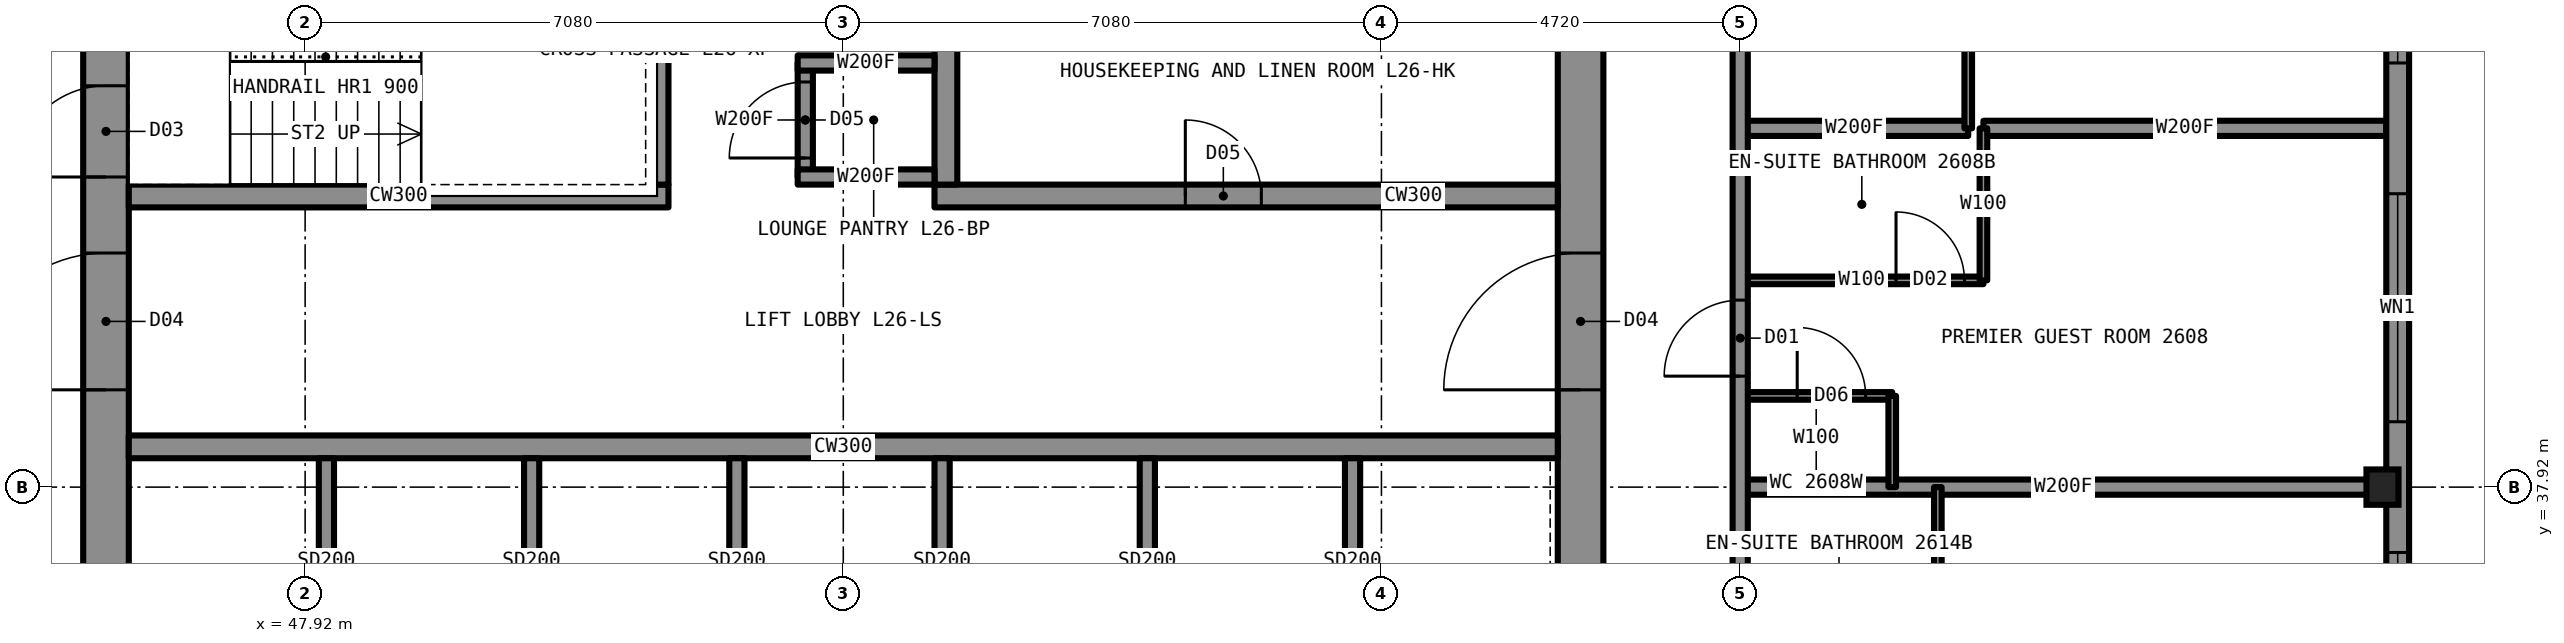
"""IFC4 building model, lengths in metres.
Left out: names, types, materials, properties, quantities, classifications, styles, units other than length and angle.
Written with IfcOpenShell. Run it as: python <this file> out.ifc"""

import sys

from ifc_helpers import new_model, si_unit, direction, frame, frame_2d, origin, origin_2d, place, context, subcontext, project, spatial, rectangle, i_section, extrude, element, fill, save


model = new_model("IFC4")
c1 = context("Model", 3, precision=1e-05, world=origin(), true_north=direction((0.0, 1.0)))
c2 = subcontext(c1, "Body", "Model", "MODEL_VIEW")
j1 = project(units=[si_unit("LENGTHUNIT", "METRE"), si_unit("PLANEANGLEUNIT", "RADIAN")], contexts=[c1])
p1 = place(None, origin())
s1 = spatial("IfcSite", under=j1, at=p1, CompositionType="ELEMENT")
p2 = place(p1, origin())
s2 = spatial("IfcBuilding", under=s1, at=p2, CompositionType="ELEMENT")
p3 = place(p2, frame((0.0, 0.0, 93.4)))
s3 = spatial("IfcBuildingStorey", under=s2, at=p3, CompositionType="ELEMENT", Elevation=93.4)
p4 = place(p3, frame((75.25, 37.92, 0.0), z_axis=(0.0, 0.0, 1.0), x_axis=(1.0, 0.0, 0.0)))
e1 = element("IfcColumn", 1, at=p4, inside=s3, PredefinedType="COLUMN", context=c2, shape_type="SweptSolid", body=[
    extrude(i_section(OverallWidth=0.442, OverallDepth=0.531, WebThickness=0.066, FlangeThickness=0.106, at=origin_2d()), origin(), (0.0, 0.0, 1.0), 3.5),
])
p5 = place(p3, frame((64.7, 35.6, 0.0), z_axis=(0.0, 0.0, 1.0), x_axis=(0.0, 1.0, 0.0)))
e2 = element("IfcWall", 2, at=p5, inside=s3, PredefinedType="SHEAR", context=c2, shape_type="SweptSolid", body=[
    extrude(rectangle(XDim=18.8, YDim=0.6, at=frame_2d((9.4, 0.0))), origin(), (0.0, 0.0, 1.0), 3.5),
])
p6 = place(p5, frame((13.4, 0.0, 0.0)))
e3 = element("IfcOpeningElement", 3, at=p6, cuts=e2, PredefinedType="OPENING", context=c2, shape_type="SweptSolid", body=[
    extrude(rectangle(XDim=1.8, YDim=2.2, at=frame_2d((0.9, 1.1))), frame((0.0, 0.31, 0.0), z_axis=(0.0, -1.0, 0.0), x_axis=(1.0, 0.0, 0.0)), (0.0, 0.0, 1.0), 0.62),
])
p7 = place(p5, frame((3.6, 0.0, 0.0)))
e4 = element("IfcOpeningElement", 4, at=p7, cuts=e2, PredefinedType="OPENING", context=c2, shape_type="SweptSolid", body=[
    extrude(rectangle(XDim=1.8, YDim=2.2, at=frame_2d((0.9, 1.1))), frame((0.0, 0.31, 0.0), z_axis=(0.0, -1.0, 0.0), x_axis=(1.0, 0.0, 0.0)), (0.0, 0.0, 1.0), 0.62),
])
p8 = place(p3, frame((45.3, 35.6, 0.0), z_axis=(0.0, 0.0, 1.0), x_axis=(0.0, 1.0, 0.0)))
e5 = element("IfcWall", 5, at=p8, inside=s3, PredefinedType="SHEAR", context=c2, shape_type="SweptSolid", body=[
    extrude(rectangle(XDim=18.8, YDim=0.6, at=frame_2d((9.4, 0.0))), origin(), (0.0, 0.0, 1.0), 3.5),
])
p9 = place(p8, frame((13.4, 0.0, 0.0)))
e6 = element("IfcOpeningElement", 6, at=p9, cuts=e5, PredefinedType="OPENING", context=c2, shape_type="SweptSolid", body=[
    extrude(rectangle(XDim=1.8, YDim=2.2, at=frame_2d((0.9, 1.1))), frame((0.0, 0.31, 0.0), z_axis=(0.0, -1.0, 0.0), x_axis=(1.0, 0.0, 0.0)), (0.0, 0.0, 1.0), 0.62),
])
p10 = place(p8, frame((3.6, 0.0, 0.0)))
e7 = element("IfcOpeningElement", 7, at=p10, cuts=e5, PredefinedType="OPENING", context=c2, shape_type="SweptSolid", body=[
    extrude(rectangle(XDim=1.8, YDim=2.2, at=frame_2d((0.9, 1.1))), frame((0.0, 0.31, 0.0), z_axis=(0.0, -1.0, 0.0), x_axis=(1.0, 0.0, 0.0)), (0.0, 0.0, 1.0), 0.62),
])
p11 = place(p8, frame((6.4, 0.0, 0.0)))
e8 = element("IfcOpeningElement", 8, at=p11, cuts=e5, PredefinedType="OPENING", context=c2, shape_type="SweptSolid", body=[
    extrude(rectangle(XDim=1.2, YDim=2.2, at=frame_2d((0.6, 1.1))), frame((0.0, 0.31, 0.0), z_axis=(0.0, -1.0, 0.0), x_axis=(1.0, 0.0, 0.0)), (0.0, 0.0, 1.0), 0.62),
])
p12 = place(p3, frame((45.6, 38.45, 0.0), z_axis=(0.0, 0.0, 1.0), x_axis=(1.0, 0.0, 0.0)))
e9 = element("IfcWall", 9, at=p12, inside=s3, PredefinedType="SHEAR", context=c2, shape_type="SweptSolid", body=[
    extrude(rectangle(XDim=18.8, YDim=0.3, at=frame_2d((9.4, 0.0))), origin(), (0.0, 0.0, 1.0), 3.5),
])
p13 = place(p3, frame((45.6, 41.75, 0.0), z_axis=(0.0, 0.0, 1.0), x_axis=(1.0, 0.0, 0.0)))
e10 = element("IfcWall", 10, at=p13, inside=s3, PredefinedType="SHEAR", context=c2, shape_type="SweptSolid", body=[
    extrude(rectangle(XDim=7.1, YDim=0.3, at=frame_2d((3.55, 0.0))), origin(), (0.0, 0.0, 1.0), 3.5),
])
p14 = place(p3, frame((56.2, 41.75, 0.0), z_axis=(0.0, 0.0, 1.0), x_axis=(1.0, 0.0, 0.0)))
e11 = element("IfcWall", 11, at=p14, inside=s3, PredefinedType="SHEAR", context=c2, shape_type="SweptSolid", body=[
    extrude(rectangle(XDim=8.2, YDim=0.3, at=frame_2d((4.1, 0.0))), origin(), (0.0, 0.0, 1.0), 3.5),
])
p15 = place(p14, frame((3.3, 0.0, 0.0)))
e12 = element("IfcOpeningElement", 12, at=p15, cuts=e11, PredefinedType="OPENING", context=c2, shape_type="SweptSolid", body=[
    extrude(rectangle(XDim=1.0, YDim=2.1, at=frame_2d((0.5, 1.05))), frame((0.0, 0.16, 0.0), z_axis=(0.0, -1.0, 0.0), x_axis=(1.0, 0.0, 0.0)), (0.0, 0.0, 1.0), 0.32),
])
p16 = place(p3, frame((52.55, 41.9, 0.0), z_axis=(0.0, 0.0, 1.0), x_axis=(0.0, 1.0, 0.0)))
e13 = element("IfcWall", 13, at=p16, inside=s3, PredefinedType="SHEAR", context=c2, shape_type="SweptSolid", body=[
    extrude(rectangle(XDim=6.2, YDim=0.3, at=frame_2d((3.1, 0.0))), origin(), (0.0, 0.0, 1.0), 3.5),
])
p17 = place(p16, frame((4.125, 0.0, 0.0)))
e14 = element("IfcOpeningElement", 14, at=p17, cuts=e13, PredefinedType="OPENING", context=c2, shape_type="SweptSolid", body=[
    extrude(rectangle(XDim=1.2, YDim=2.2, at=frame_2d((0.6, 1.1))), frame((0.0, 0.16, 0.0), z_axis=(0.0, -1.0, 0.0), x_axis=(1.0, 0.0, 0.0)), (0.0, 0.0, 1.0), 0.32),
])
p18 = place(p3, frame((56.35, 41.9, 0.0), z_axis=(0.0, 0.0, 1.0), x_axis=(0.0, 1.0, 0.0)))
e15 = element("IfcWall", 15, at=p18, inside=s3, PredefinedType="SHEAR", context=c2, shape_type="SweptSolid", body=[
    extrude(rectangle(XDim=9.5, YDim=0.3, at=frame_2d((4.75, 0.0))), origin(), (0.0, 0.0, 1.0), 3.5),
])
p19 = place(p18, frame((7.1, 0.0, 0.0)))
e16 = element("IfcOpeningElement", 16, at=p19, cuts=e15, PredefinedType="OPENING", context=c2, shape_type="SweptSolid", body=[
    extrude(rectangle(XDim=1.8, YDim=2.2, at=frame_2d((0.9, 1.1))), frame((0.0, 0.16, 0.0), z_axis=(0.0, -1.0, 0.0), x_axis=(1.0, 0.0, 0.0)), (0.0, 0.0, 1.0), 0.32),
])
p20 = place(p3, frame((66.8, 42.64, 0.0), z_axis=(0.0, 0.0, 1.0), x_axis=(1.0, 0.0, 0.0)))
e17 = element("IfcWall", 17, at=p20, inside=s3, PredefinedType="PARTITIONING", context=c2, shape_type="SweptSolid", body=[
    extrude(rectangle(XDim=3.0, YDim=0.2, at=frame_2d((1.5, 0.0))), origin(), (0.0, 0.0, 1.0), 2.731),
])
p21 = place(p3, frame((70.0, 42.64, 0.0), z_axis=(0.0, 0.0, 1.0), x_axis=(1.0, 0.0, 0.0)))
e18 = element("IfcWall", 18, at=p21, inside=s3, PredefinedType="PARTITIONING", context=c2, shape_type="SweptSolid", body=[
    extrude(rectangle(XDim=5.3, YDim=0.2, at=frame_2d((2.65, 0.0))), origin(), (0.0, 0.0, 1.0), 2.731),
])
p22 = place(p3, frame((66.8, 40.64, 0.0), z_axis=(0.0, 0.0, 1.0), x_axis=(1.0, 0.0, 0.0)))
e19 = element("IfcWall", 19, at=p22, inside=s3, PredefinedType="PARTITIONING", context=c2, shape_type="SweptSolid", body=[
    extrude(rectangle(XDim=3.2, YDim=0.1, at=frame_2d((1.6, 0.0))), origin(), (0.0, 0.0, 1.0), 3.33),
])
p23 = place(p22, frame((2.05, 0.0, 0.0)))
e20 = element("IfcOpeningElement", 20, at=p23, cuts=e19, PredefinedType="OPENING", context=c2, shape_type="SweptSolid", body=[
    extrude(rectangle(XDim=0.9, YDim=2.1, at=frame_2d((0.45, 1.05))), frame((0.0, 0.06, 0.0), z_axis=(0.0, -1.0, 0.0), x_axis=(1.0, 0.0, 0.0)), (0.0, 0.0, 1.0), 0.12),
])
p24 = place(p3, frame((66.8, 39.12, 0.0), z_axis=(0.0, 0.0, 1.0), x_axis=(1.0, 0.0, 0.0)))
e21 = element("IfcWall", 21, at=p24, inside=s3, PredefinedType="PARTITIONING", context=c2, shape_type="SweptSolid", body=[
    extrude(rectangle(XDim=2.0, YDim=0.1, at=frame_2d((1.0, 0.0))), origin(), (0.0, 0.0, 1.0), 3.33),
])
p25 = place(p24, frame((0.75, 0.0, 0.0)))
e22 = element("IfcOpeningElement", 22, at=p25, cuts=e21, PredefinedType="OPENING", context=c2, shape_type="SweptSolid", body=[
    extrude(rectangle(XDim=0.9, YDim=2.1, at=frame_2d((0.45, 1.05))), frame((0.0, 0.06, 0.0), z_axis=(0.0, -1.0, 0.0), x_axis=(1.0, 0.0, 0.0)), (0.0, 0.0, 1.0), 0.12),
])
p26 = place(p3, frame((66.8, 37.92, 0.0), z_axis=(0.0, 0.0, 1.0), x_axis=(1.0, 0.0, 0.0)))
e23 = element("IfcWall", 23, at=p26, inside=s3, PredefinedType="PARTITIONING", context=c2, shape_type="SweptSolid", body=[
    extrude(rectangle(XDim=8.5, YDim=0.2, at=frame_2d((4.25, 0.0))), origin(), (0.0, 0.0, 1.0), 2.573),
])
p27 = place(p3, frame((66.8, 33.22, 0.0), z_axis=(0.0, 0.0, 1.0), x_axis=(0.0, 1.0, 0.0)))
e24 = element("IfcWall", 24, at=p27, inside=s3, PredefinedType="PARTITIONING", context=c2, shape_type="SweptSolid", body=[
    extrude(rectangle(XDim=23.56, YDim=0.2, at=frame_2d((11.78, 0.0))), origin(), (0.0, 0.0, 1.0), 3.33),
])
p28 = place(p27, frame((6.16, 0.0, 0.0)))
e25 = element("IfcOpeningElement", 25, at=p28, cuts=e24, PredefinedType="OPENING", context=c2, shape_type="SweptSolid", body=[
    extrude(rectangle(XDim=1.0, YDim=2.2, at=frame_2d((0.5, 1.1))), frame((0.0, 0.11, 0.0), z_axis=(0.0, -1.0, 0.0), x_axis=(1.0, 0.0, 0.0)), (0.0, 0.0, 1.0), 0.22),
])
p29 = place(p27, frame((12.42, 0.0, 0.0)))
e26 = element("IfcOpeningElement", 26, at=p29, cuts=e24, PredefinedType="OPENING", context=c2, shape_type="SweptSolid", body=[
    extrude(rectangle(XDim=1.0, YDim=2.2, at=frame_2d((0.5, 1.1))), frame((0.0, 0.11, 0.0), z_axis=(0.0, -1.0, 0.0), x_axis=(1.0, 0.0, 0.0)), (0.0, 0.0, 1.0), 0.22),
])
p30 = place(p27, frame((21.82, 0.0, 0.0)))
e27 = element("IfcOpeningElement", 27, at=p30, cuts=e24, PredefinedType="OPENING", context=c2, shape_type="SweptSolid", body=[
    extrude(rectangle(XDim=1.1, YDim=2.2, at=frame_2d((0.55, 1.1))), frame((0.0, 0.11, 0.0), z_axis=(0.0, -1.0, 0.0), x_axis=(1.0, 0.0, 0.0)), (0.0, 0.0, 1.0), 0.22),
])
p31 = place(p27, frame((0.64, 0.0, 0.0)))
e28 = element("IfcOpeningElement", 28, at=p31, cuts=e24, PredefinedType="OPENING", context=c2, shape_type="SweptSolid", body=[
    extrude(rectangle(XDim=1.1, YDim=2.2, at=frame_2d((0.55, 1.1))), frame((0.0, 0.11, 0.0), z_axis=(0.0, -1.0, 0.0), x_axis=(1.0, 0.0, 0.0)), (0.0, 0.0, 1.0), 0.22),
])
p32 = place(p3, frame((68.8, 37.92, 0.0), z_axis=(0.0, 0.0, 1.0), x_axis=(0.0, 1.0, 0.0)))
e29 = element("IfcWall", 29, at=p32, inside=s3, PredefinedType="PARTITIONING", context=c2, shape_type="SweptSolid", body=[
    extrude(rectangle(XDim=1.2, YDim=0.1, at=frame_2d((0.6, 0.0))), origin(), (0.0, 0.0, 1.0), 3.33),
])
p33 = place(p3, frame((69.4, 35.32, 0.0), z_axis=(0.0, 0.0, 1.0), x_axis=(0.0, 1.0, 0.0)))
e30 = element("IfcWall", 30, at=p33, inside=s3, PredefinedType="PARTITIONING", context=c2, shape_type="SweptSolid", body=[
    extrude(rectangle(XDim=2.6, YDim=0.1, at=frame_2d((1.3, 0.0))), origin(), (0.0, 0.0, 1.0), 3.33),
])
p34 = place(p3, frame((69.8, 42.64, 0.0), z_axis=(0.0, 0.0, 1.0), x_axis=(0.0, 1.0, 0.0)))
e31 = element("IfcWall", 31, at=p34, inside=s3, PredefinedType="PARTITIONING", context=c2, shape_type="SweptSolid", body=[
    extrude(rectangle(XDim=2.6, YDim=0.1, at=frame_2d((1.3, 0.0))), origin(), (0.0, 0.0, 1.0), 3.33),
])
p35 = place(p3, frame((70.0, 40.64, 0.0), z_axis=(0.0, 0.0, 1.0), x_axis=(0.0, 1.0, 0.0)))
e32 = element("IfcWall", 32, at=p35, inside=s3, PredefinedType="PARTITIONING", context=c2, shape_type="SweptSolid", body=[
    extrude(rectangle(XDim=2.0, YDim=0.1, at=frame_2d((1.0, 0.0))), origin(), (0.0, 0.0, 1.0), 3.33),
])
p36 = place(p3, frame((54.5, 42.0, 0.0), z_axis=(0.0, 0.0, 1.0), x_axis=(0.0, 1.0, 0.0)))
e33 = element("IfcWall", 33, at=p36, inside=s3, PredefinedType="PARTITIONING", context=c2, shape_type="SweptSolid", body=[
    extrude(rectangle(XDim=3.1, YDim=0.2, at=frame_2d((1.55, 0.0))), origin(), (0.0, 0.0, 1.0), 3.33),
])
p37 = place(p36, frame((1.05, 0.0, 0.0)))
e34 = element("IfcOpeningElement", 34, at=p37, cuts=e33, PredefinedType="OPENING", context=c2, shape_type="SweptSolid", body=[
    extrude(rectangle(XDim=1.0, YDim=2.1, at=frame_2d((0.5, 1.05))), frame((0.0, 0.11, 0.0), z_axis=(0.0, -1.0, 0.0), x_axis=(1.0, 0.0, 0.0)), (0.0, 0.0, 1.0), 0.22),
])
p38 = place(p3, frame((54.4, 42.0, 0.0), z_axis=(0.0, 0.0, 1.0), x_axis=(1.0, 0.0, 0.0)))
e35 = element("IfcWall", 35, at=p38, inside=s3, PredefinedType="PARTITIONING", context=c2, shape_type="SweptSolid", body=[
    extrude(rectangle(XDim=1.8, YDim=0.2, at=frame_2d((0.9, 0.0))), origin(), (0.0, 0.0, 1.0), 3.33),
])
p39 = place(p3, frame((75.45, 29.9, 0.0), z_axis=(0.0, 0.0, 1.0), x_axis=(0.0, 1.0, 0.0)))
e36 = element("IfcWall", 36, at=p39, inside=s3, PredefinedType="SOLIDWALL", context=c2, shape_type="SweptSolid", body=[
    extrude(rectangle(XDim=30.2, YDim=0.3, at=frame_2d((15.1, 0.0))), origin(), (0.0, 0.0, 1.0), 2.83),
])
p40 = place(p39, frame((0.85, 0.0, 0.5)))
e37 = element("IfcOpeningElement", 37, at=p40, cuts=e36, PredefinedType="OPENING", context=c2, shape_type="SweptSolid", body=[
    extrude(rectangle(XDim=1.6, YDim=2.0, at=frame_2d((0.8, 1.0))), frame((0.0, 0.16, 0.0), z_axis=(0.0, -1.0, 0.0), x_axis=(1.0, 0.0, 0.0)), (0.0, 0.0, 1.0), 0.32),
])
p41 = place(p39, frame((4.16, 0.0, 0.5)))
e38 = element("IfcOpeningElement", 38, at=p41, cuts=e36, PredefinedType="OPENING", context=c2, shape_type="SweptSolid", body=[
    extrude(rectangle(XDim=3.0, YDim=2.0, at=frame_2d((1.5, 1.0))), frame((0.0, 0.16, 0.0), z_axis=(0.0, -1.0, 0.0), x_axis=(1.0, 0.0, 0.0)), (0.0, 0.0, 1.0), 0.32),
])
p42 = place(p39, frame((8.88, 0.0, 0.5)))
e39 = element("IfcOpeningElement", 39, at=p42, cuts=e36, PredefinedType="OPENING", context=c2, shape_type="SweptSolid", body=[
    extrude(rectangle(XDim=3.0, YDim=2.0, at=frame_2d((1.5, 1.0))), frame((0.0, 0.16, 0.0), z_axis=(0.0, -1.0, 0.0), x_axis=(1.0, 0.0, 0.0)), (0.0, 0.0, 1.0), 0.32),
])
p43 = place(p39, frame((13.6, 0.0, 0.5)))
e40 = element("IfcOpeningElement", 40, at=p43, cuts=e36, PredefinedType="OPENING", context=c2, shape_type="SweptSolid", body=[
    extrude(rectangle(XDim=3.0, YDim=2.0, at=frame_2d((1.5, 1.0))), frame((0.0, 0.16, 0.0), z_axis=(0.0, -1.0, 0.0), x_axis=(1.0, 0.0, 0.0)), (0.0, 0.0, 1.0), 0.32),
])
p44 = place(p39, frame((18.32, 0.0, 0.5)))
e41 = element("IfcOpeningElement", 41, at=p44, cuts=e36, PredefinedType="OPENING", context=c2, shape_type="SweptSolid", body=[
    extrude(rectangle(XDim=3.0, YDim=2.0, at=frame_2d((1.5, 1.0))), frame((0.0, 0.16, 0.0), z_axis=(0.0, -1.0, 0.0), x_axis=(1.0, 0.0, 0.0)), (0.0, 0.0, 1.0), 0.32),
])
p45 = place(p39, frame((23.04, 0.0, 0.5)))
e42 = element("IfcOpeningElement", 42, at=p45, cuts=e36, PredefinedType="OPENING", context=c2, shape_type="SweptSolid", body=[
    extrude(rectangle(XDim=3.0, YDim=2.0, at=frame_2d((1.5, 1.0))), frame((0.0, 0.16, 0.0), z_axis=(0.0, -1.0, 0.0), x_axis=(1.0, 0.0, 0.0)), (0.0, 0.0, 1.0), 0.32),
])
p46 = place(p39, frame((27.75, 0.0, 0.5)))
e43 = element("IfcOpeningElement", 43, at=p46, cuts=e36, PredefinedType="OPENING", context=c2, shape_type="SweptSolid", body=[
    extrude(rectangle(XDim=1.6, YDim=2.0, at=frame_2d((0.8, 1.0))), frame((0.0, 0.16, 0.0), z_axis=(0.0, -1.0, 0.0), x_axis=(1.0, 0.0, 0.0)), (0.0, 0.0, 1.0), 0.32),
])
for number, where, z_axis, x_axis in (
    (44, (48.2, 35.6, 0.0), (0.0, 0.0, 1.0), (0.0, 1.0, 0.0)),
    (45, (50.9, 35.6, 0.0), (0.0, 0.0, 1.0), (0.0, 1.0, 0.0)),
    (46, (53.6, 35.6, 0.0), (0.0, 0.0, 1.0), (0.0, 1.0, 0.0)),
    (47, (56.3, 35.6, 0.0), (0.0, 0.0, 1.0), (0.0, 1.0, 0.0)),
    (48, (59.0, 35.6, 0.0), (0.0, 0.0, 1.0), (0.0, 1.0, 0.0)),
    (49, (61.7, 35.6, 0.0), (0.0, 0.0, 1.0), (0.0, 1.0, 0.0)),
):
    element("IfcWall", number, at=place(p3, frame(where, z_axis=z_axis, x_axis=x_axis)), inside=s3, PredefinedType="PARTITIONING", context=c2, shape_type="SweptSolid", body=[
        extrude(rectangle(XDim=2.7, YDim=0.2, at=frame_2d((1.35, 0.0))), origin(), (0.0, 0.0, 1.0), 3.33),
    ])
p47 = place(p28, origin())
e50 = element("IfcDoor", 50, at=p47, inside=s3, OperationType="SINGLE_SWING_LEFT", PredefinedType="DOOR", context=c2, shape_type="SweptSolid", body=[
    extrude(rectangle(XDim=1.0, YDim=2.2, at=frame_2d((0.5, 1.1))), frame((0.0, 0.025, 0.0), z_axis=(0.0, -1.0, 0.0), x_axis=(1.0, 0.0, 0.0)), (0.0, 0.0, 1.0), 0.05),
])
fill(e25, e50)
p48 = place(p23, origin())
e51 = element("IfcDoor", 51, at=p48, inside=s3, OperationType="SINGLE_SWING_RIGHT", PredefinedType="DOOR", context=c2, shape_type="SweptSolid", body=[
    extrude(rectangle(XDim=0.9, YDim=2.1, at=frame_2d((0.45, 1.05))), frame((0.0, 0.025, 0.0), z_axis=(0.0, -1.0, 0.0), x_axis=(1.0, 0.0, 0.0)), (0.0, 0.0, 1.0), 0.05),
])
fill(e20, e51)
p49 = place(p25, origin())
e52 = element("IfcDoor", 52, at=p49, inside=s3, OperationType="SINGLE_SWING_LEFT", PredefinedType="DOOR", context=c2, shape_type="SweptSolid", body=[
    extrude(rectangle(XDim=0.9, YDim=2.1, at=frame_2d((0.45, 1.05))), frame((0.0, 0.025, 0.0), z_axis=(0.0, -1.0, 0.0), x_axis=(1.0, 0.0, 0.0)), (0.0, 0.0, 1.0), 0.05),
])
fill(e22, e52)
p50 = place(p37, origin())
e53 = element("IfcDoor", 53, at=p50, inside=s3, OperationType="SINGLE_SWING_LEFT", PredefinedType="DOOR", context=c2, shape_type="SweptSolid", body=[
    extrude(rectangle(XDim=1.0, YDim=2.1, at=frame_2d((0.5, 1.05))), frame((0.0, 0.025, 0.0), z_axis=(0.0, -1.0, 0.0), x_axis=(1.0, 0.0, 0.0)), (0.0, 0.0, 1.0), 0.05),
])
fill(e34, e53)
p51 = place(p41, origin())
e54 = element("IfcWindow", 54, at=p51, inside=s3, PartitioningType="SINGLE_PANEL", PredefinedType="WINDOW", context=c2, shape_type="SweptSolid", body=[
    extrude(rectangle(XDim=3.0, YDim=2.0, at=frame_2d((1.5, 1.0))), frame((0.0, 0.03, 0.0), z_axis=(0.0, -1.0, 0.0), x_axis=(1.0, 0.0, 0.0)), (0.0, 0.0, 1.0), 0.06),
])
fill(e38, e54)
p52 = place(p42, origin())
e55 = element("IfcWindow", 55, at=p52, inside=s3, PartitioningType="SINGLE_PANEL", PredefinedType="WINDOW", context=c2, shape_type="SweptSolid", body=[
    extrude(rectangle(XDim=3.0, YDim=2.0, at=frame_2d((1.5, 1.0))), frame((0.0, 0.03, 0.0), z_axis=(0.0, -1.0, 0.0), x_axis=(1.0, 0.0, 0.0)), (0.0, 0.0, 1.0), 0.06),
])
fill(e39, e55)
p53 = place(p43, origin())
e56 = element("IfcWindow", 56, at=p53, inside=s3, PartitioningType="SINGLE_PANEL", PredefinedType="WINDOW", context=c2, shape_type="SweptSolid", body=[
    extrude(rectangle(XDim=3.0, YDim=2.0, at=frame_2d((1.5, 1.0))), frame((0.0, 0.03, 0.0), z_axis=(0.0, -1.0, 0.0), x_axis=(1.0, 0.0, 0.0)), (0.0, 0.0, 1.0), 0.06),
])
fill(e40, e56)
p54 = place(p10, origin())
e57 = element("IfcDoor", 57, at=p54, inside=s3, OperationType="DOUBLE_DOOR_SINGLE_SWING", PredefinedType="DOOR", context=c2, shape_type="SweptSolid", body=[
    extrude(rectangle(XDim=1.8, YDim=2.2, at=frame_2d((0.9, 1.1))), frame((0.0, 0.025, 0.0), z_axis=(0.0, -1.0, 0.0), x_axis=(1.0, 0.0, 0.0)), (0.0, 0.0, 1.0), 0.05),
])
fill(e7, e57)
p55 = place(p7, origin())
e58 = element("IfcDoor", 58, at=p55, inside=s3, OperationType="DOUBLE_DOOR_SINGLE_SWING", PredefinedType="DOOR", context=c2, shape_type="SweptSolid", body=[
    extrude(rectangle(XDim=1.8, YDim=2.2, at=frame_2d((0.9, 1.1))), frame((0.0, 0.025, 0.0), z_axis=(0.0, -1.0, 0.0), x_axis=(1.0, 0.0, 0.0)), (0.0, 0.0, 1.0), 0.05),
])
fill(e4, e58)
p56 = place(p11, origin())
e59 = element("IfcDoor", 59, at=p56, inside=s3, OperationType="SINGLE_SWING_LEFT", PredefinedType="DOOR", context=c2, shape_type="SweptSolid", body=[
    extrude(rectangle(XDim=1.2, YDim=2.2, at=frame_2d((0.6, 1.1))), frame((0.0, 0.025, 0.0), z_axis=(0.0, -1.0, 0.0), x_axis=(1.0, 0.0, 0.0)), (0.0, 0.0, 1.0), 0.05),
])
fill(e8, e59)
p57 = place(p15, origin())
e60 = element("IfcDoor", 60, at=p57, inside=s3, OperationType="SINGLE_SWING_LEFT", PredefinedType="DOOR", context=c2, shape_type="SweptSolid", body=[
    extrude(rectangle(XDim=1.0, YDim=2.1, at=frame_2d((0.5, 1.05))), frame((0.0, 0.025, 0.0), z_axis=(0.0, -1.0, 0.0), x_axis=(1.0, 0.0, 0.0)), (0.0, 0.0, 1.0), 0.05),
])
fill(e12, e60)
save(model, sys.argv[1])
